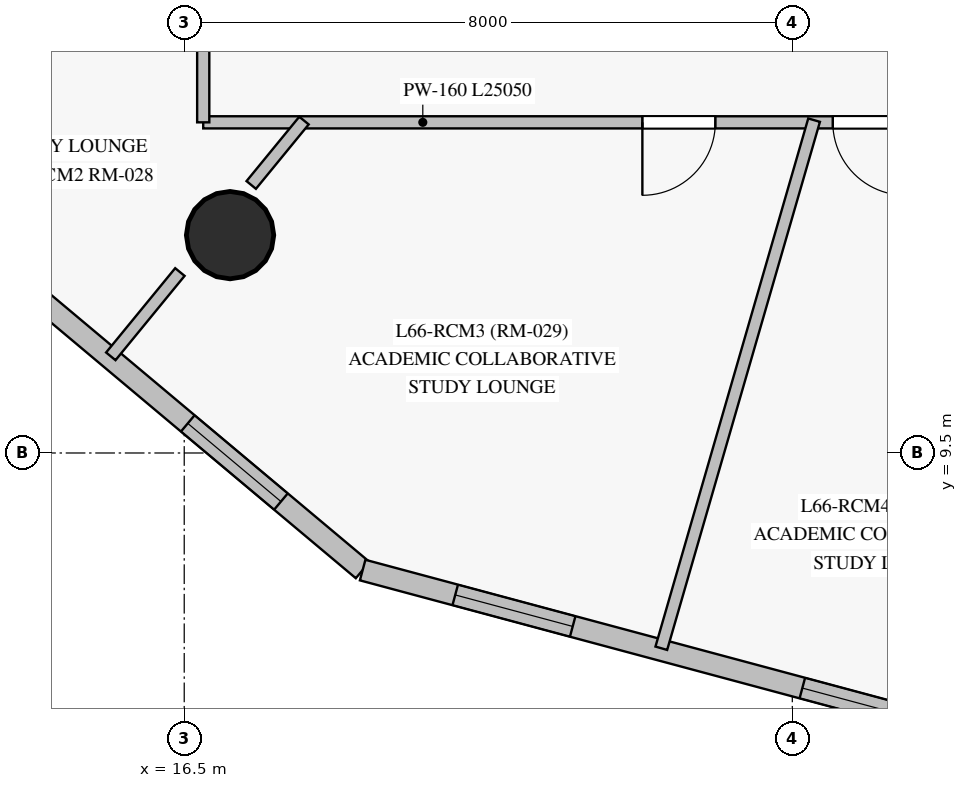
"""IFC4 building model, lengths in metres.
Left out: names, types, materials, properties, quantities, classifications, styles, units other than length and angle.
Written with IfcOpenShell. Run it as: python <this file> out.ifc"""

import sys

from ifc_helpers import new_model, si_unit, direction, frame, frame_2d, origin, origin_with_axes, origin_2d, place, context, subcontext, project, spatial, rectangle, circle, extrude, source, transform, mapped, element, fill, save


model = new_model("IFC4")
c1 = context("Model", 3, precision=1e-05, world=origin(), true_north=direction((0.0, 1.0)))
c2 = subcontext(c1, "Body", "Model", "MODEL_VIEW")
j1 = project(units=[si_unit("LENGTHUNIT", "METRE"), si_unit("PLANEANGLEUNIT", "RADIAN")], contexts=[c1])
p1 = place(None, origin())
s1 = spatial("IfcSite", under=j1, at=p1, CompositionType="ELEMENT")
p2 = place(p1, origin())
s2 = spatial("IfcBuilding", under=s1, at=p2, CompositionType="ELEMENT")
p3 = place(p2, frame((0.0, 0.0, 226.05)))
s3 = spatial("IfcBuildingStorey", under=s2, at=p3, CompositionType="ELEMENT", Elevation=226.05)
m1 = source(origin_with_axes(), c2, "Body", "SweptSolid", [
    extrude(circle(Radius=0.575, at=origin_2d()), origin(), (0.0, 0.0, 1.0), 3.05),
])
p4 = place(p3, frame((17.103, 12.366, 0.0), z_axis=(0.0, 0.0, 1.0), x_axis=(1.0, 0.0, 0.0)))
e1 = element("IfcColumn", 1, at=p4, inside=s3, PredefinedType="COLUMN", context=c2, shape_type="MappedRepresentation", body=[
    mapped(m1, transform((0.0, 0.0, 0.0), scale=1.0)),
])
p5 = place(p3, frame((9.079, 16.153, 0.0), z_axis=(0.0, 0.0, 1.0), x_axis=(0.766159608143, -0.64265033638, 0.0)))
e2 = element("IfcWall", 2, at=p5, inside=s3, PredefinedType="SOLIDWALL", context=c2, shape_type="SweptSolid", body=[
    extrude(rectangle(XDim=12.75, YDim=0.28, at=frame_2d((6.375, 0.0))), origin(), (0.0, 0.0, 1.0), 2.85),
])
p6 = place(p5, frame((0.584, 0.0, 0.85)))
e3 = element("IfcOpeningElement", 3, at=p6, cuts=e2, PredefinedType="OPENING", context=c2, shape_type="SweptSolid", body=[
    extrude(rectangle(XDim=0.95, YDim=1.5, at=frame_2d((0.475, 0.75))), frame((0.0, 0.15, 0.0), z_axis=(0.0, -1.0, 0.0), x_axis=(1.0, 0.0, 0.0)), (0.0, 0.0, 1.0), 0.3),
])
p7 = place(p5, frame((4.431, 0.0, 0.85)))
e4 = element("IfcOpeningElement", 4, at=p7, cuts=e2, PredefinedType="OPENING", context=c2, shape_type="SweptSolid", body=[
    extrude(rectangle(XDim=1.6, YDim=1.6, at=frame_2d((0.8, 0.8))), frame((0.0, 0.15, 0.0), z_axis=(0.0, -1.0, 0.0), x_axis=(1.0, 0.0, 0.0)), (0.0, 0.0, 1.0), 0.3),
])
p8 = place(p5, frame((9.747, 0.0, 0.85)))
e5 = element("IfcOpeningElement", 5, at=p8, cuts=e2, PredefinedType="OPENING", context=c2, shape_type="SweptSolid", body=[
    extrude(rectangle(XDim=1.6, YDim=1.6, at=frame_2d((0.8, 0.8))), frame((0.0, 0.15, 0.0), z_axis=(0.0, -1.0, 0.0), x_axis=(1.0, 0.0, 0.0)), (0.0, 0.0, 1.0), 0.3),
])
p9 = place(p3, frame((18.847, 7.96, 0.0), z_axis=(0.0, 0.0, 1.0), x_axis=(0.965828362132, -0.259182512722, 0.0)))
e6 = element("IfcWall", 6, at=p9, inside=s3, PredefinedType="SOLIDWALL", context=c2, shape_type="SweptSolid", body=[
    extrude(rectangle(XDim=9.576, YDim=0.28, at=frame_2d((4.788, 0.0))), origin(), (0.0, 0.0, 1.0), 2.85),
])
p10 = place(p9, frame((1.261, 0.0, 0.85)))
e7 = element("IfcOpeningElement", 7, at=p10, cuts=e6, PredefinedType="OPENING", context=c2, shape_type="SweptSolid", body=[
    extrude(rectangle(XDim=1.6, YDim=1.6, at=frame_2d((0.8, 0.8))), frame((0.0, 0.15, 0.0), z_axis=(0.0, -1.0, 0.0), x_axis=(1.0, 0.0, 0.0)), (0.0, 0.0, 1.0), 0.3),
])
p11 = place(p9, frame((5.989, 0.0, 0.85)))
e8 = element("IfcOpeningElement", 8, at=p11, cuts=e6, PredefinedType="OPENING", context=c2, shape_type="SweptSolid", body=[
    extrude(rectangle(XDim=1.6, YDim=1.6, at=frame_2d((0.8, 0.8))), frame((0.0, 0.15, 0.0), z_axis=(0.0, -1.0, 0.0), x_axis=(1.0, 0.0, 0.0)), (0.0, 0.0, 1.0), 0.3),
])
p12 = place(p3, frame((41.8, 13.85, 0.0), z_axis=(0.0, 0.0, 1.0), x_axis=(-1.0, 0.0, 0.0)))
e9 = element("IfcWall", 9, at=p12, inside=s3, PredefinedType="PARTITIONING", context=c2, shape_type="SweptSolid", body=[
    extrude(rectangle(XDim=25.05, YDim=0.16, at=frame_2d((12.525, 0.0))), origin(), (0.0, 0.0, 1.0), 2.3),
])
p13 = place(p12, frame((9.563, 0.0, 0.0)))
e10 = element("IfcOpeningElement", 10, at=p13, cuts=e9, PredefinedType="OPENING", context=c2, shape_type="SweptSolid", body=[
    extrude(rectangle(XDim=0.96, YDim=2.15, at=frame_2d((0.48, 1.075))), frame((0.0, 0.09, 0.0), z_axis=(0.0, -1.0, 0.0), x_axis=(1.0, 0.0, 0.0)), (0.0, 0.0, 1.0), 0.18),
])
p14 = place(p12, frame((4.621, 0.0, 0.0)))
e11 = element("IfcOpeningElement", 11, at=p14, cuts=e9, PredefinedType="OPENING", context=c2, shape_type="SweptSolid", body=[
    extrude(rectangle(XDim=0.96, YDim=2.15, at=frame_2d((0.48, 1.075))), frame((0.0, 0.09, 0.0), z_axis=(0.0, -1.0, 0.0), x_axis=(1.0, 0.0, 0.0)), (0.0, 0.0, 1.0), 0.18),
])
p15 = place(p12, frame((18.312, 0.0, 0.0)))
e12 = element("IfcOpeningElement", 12, at=p15, cuts=e9, PredefinedType="OPENING", context=c2, shape_type="SweptSolid", body=[
    extrude(rectangle(XDim=0.96, YDim=2.15, at=frame_2d((0.48, 1.075))), frame((0.0, 0.09, 0.0), z_axis=(0.0, -1.0, 0.0), x_axis=(1.0, 0.0, 0.0)), (0.0, 0.0, 1.0), 0.18),
])
p16 = place(p12, frame((15.808, 0.0, 0.0)))
e13 = element("IfcOpeningElement", 13, at=p16, cuts=e9, PredefinedType="OPENING", context=c2, shape_type="SweptSolid", body=[
    extrude(rectangle(XDim=0.96, YDim=2.15, at=frame_2d((0.48, 1.075))), frame((0.0, 0.09, 0.0), z_axis=(0.0, -1.0, 0.0), x_axis=(1.0, 0.0, 0.0)), (0.0, 0.0, 1.0), 0.18),
])
p17 = place(p3, frame((16.75, 13.85, 0.0), z_axis=(0.0, 0.0, 1.0), x_axis=(0.0, 1.0, 0.0)))
e14 = element("IfcWall", 14, at=p17, inside=s3, PredefinedType="PARTITIONING", context=c2, shape_type="SweptSolid", body=[
    extrude(rectangle(XDim=17.8, YDim=0.16, at=frame_2d((8.9, 0.0))), origin(), (0.0, 0.0, 1.0), 2.45),
])
p18 = place(p17, frame((15.299, 0.0, 0.0)))
e15 = element("IfcOpeningElement", 15, at=p18, cuts=e14, PredefinedType="OPENING", context=c2, shape_type="SweptSolid", body=[
    extrude(rectangle(XDim=0.96, YDim=2.15, at=frame_2d((0.48, 1.075))), frame((0.0, 0.09, 0.0), z_axis=(0.0, -1.0, 0.0), x_axis=(1.0, 0.0, 0.0)), (0.0, 0.0, 1.0), 0.18),
])
p19 = place(p17, frame((11.095, 0.0, 0.0)))
e16 = element("IfcOpeningElement", 16, at=p19, cuts=e14, PredefinedType="OPENING", context=c2, shape_type="SweptSolid", body=[
    extrude(rectangle(XDim=0.96, YDim=2.15, at=frame_2d((0.48, 1.075))), frame((0.0, 0.09, 0.0), z_axis=(0.0, -1.0, 0.0), x_axis=(1.0, 0.0, 0.0)), (0.0, 0.0, 1.0), 0.18),
])
p20 = place(p17, frame((8.425, 0.0, 0.0)))
e17 = element("IfcOpeningElement", 17, at=p20, cuts=e14, PredefinedType="OPENING", context=c2, shape_type="SweptSolid", body=[
    extrude(rectangle(XDim=0.96, YDim=2.15, at=frame_2d((0.48, 1.075))), frame((0.0, 0.09, 0.0), z_axis=(0.0, -1.0, 0.0), x_axis=(1.0, 0.0, 0.0)), (0.0, 0.0, 1.0), 0.18),
])
p21 = place(p17, frame((3.435, 0.0, 0.0)))
e18 = element("IfcOpeningElement", 18, at=p21, cuts=e14, PredefinedType="OPENING", context=c2, shape_type="SweptSolid", body=[
    extrude(rectangle(XDim=0.96, YDim=2.15, at=frame_2d((0.48, 1.075))), frame((0.0, 0.09, 0.0), z_axis=(0.0, -1.0, 0.0), x_axis=(1.0, 0.0, 0.0)), (0.0, 0.0, 1.0), 0.18),
])
p22 = place(p3, frame((24.787, 13.879, 0.0), z_axis=(0.0, 0.0, 1.0), x_axis=(-0.277907263558, -0.960607907974, 0.0)))
e19 = element("IfcWall", 19, at=p22, inside=s3, PredefinedType="PARTITIONING", context=c2, shape_type="SweptSolid", body=[
    extrude(rectangle(XDim=7.233, YDim=0.16, at=frame_2d((3.616, 0.0))), origin(), (0.0, 0.0, 1.0), 2.85),
])
p23 = place(p3, frame((16.443, 11.881, 0.0), z_axis=(0.0, 0.0, 1.0), x_axis=(-0.633849489402, -0.773456414276, 0.0)))
e20 = element("IfcWall", 20, at=p23, inside=s3, PredefinedType="PARTITIONING", context=c2, shape_type="SweptSolid", body=[
    extrude(rectangle(XDim=1.434, YDim=0.16, at=frame_2d((0.717, 0.0))), origin(), (0.0, 0.0, 1.0), 2.85),
])
p24 = place(p3, frame((18.076, 13.873, 0.0), z_axis=(0.0, 0.0, 1.0), x_axis=(-0.633650360899, -0.773619557749, 0.0)))
e21 = element("IfcWall", 21, at=p24, inside=s3, PredefinedType="PARTITIONING", context=c2, shape_type="SweptSolid", body=[
    extrude(rectangle(XDim=1.095, YDim=0.16, at=frame_2d((0.548, 0.0))), origin(), (0.0, 0.0, 1.0), 2.35),
])
m2 = source(origin_with_axes(), c2, "Body", "SweptSolid", [
    extrude(rectangle(XDim=1.6, YDim=1.6, at=frame_2d((0.8, 0.8))), frame((0.0, 0.03, 0.0), z_axis=(0.0, -1.0, 0.0), x_axis=(1.0, 0.0, 0.0)), (0.0, 0.0, 1.0), 0.06),
])
p25 = place(p8, origin())
e22 = element("IfcWindow", 22, at=p25, inside=s3, PartitioningType="SINGLE_PANEL", PredefinedType="WINDOW", context=c2, shape_type="MappedRepresentation", body=[
    mapped(m2, transform((0.0, 0.0, 0.0), scale=1.0)),
])
fill(e5, e22)
p26 = place(p10, origin())
e23 = element("IfcWindow", 23, at=p26, inside=s3, PartitioningType="SINGLE_PANEL", PredefinedType="WINDOW", context=c2, shape_type="MappedRepresentation", body=[
    mapped(m2, transform((0.0, 0.0, 0.0), scale=1.0)),
])
fill(e7, e23)
p27 = place(p11, origin())
e24 = element("IfcWindow", 24, at=p27, inside=s3, PartitioningType="SINGLE_PANEL", PredefinedType="WINDOW", context=c2, shape_type="MappedRepresentation", body=[
    mapped(m2, transform((0.0, 0.0, 0.0), scale=1.0)),
])
fill(e8, e24)
m3 = source(origin_with_axes(), c2, "Body", "SweptSolid", [
    extrude(rectangle(XDim=0.96, YDim=2.15, at=frame_2d((0.48, 1.075))), frame((0.0, 0.025, 0.0), z_axis=(0.0, -1.0, 0.0), x_axis=(1.0, 0.0, 0.0)), (0.0, 0.0, 1.0), 0.05),
])
p28 = place(p15, origin())
e25 = element("IfcDoor", 25, at=p28, inside=s3, OperationType="SINGLE_SWING_RIGHT", PredefinedType="DOOR", context=c2, shape_type="MappedRepresentation", body=[
    mapped(m3, transform((0.0, 0.0, 0.0), scale=1.0)),
])
fill(e12, e25)
p29 = place(p16, origin())
e26 = element("IfcDoor", 26, at=p29, inside=s3, OperationType="SINGLE_SWING_LEFT", PredefinedType="DOOR", context=c2, shape_type="MappedRepresentation", body=[
    mapped(m3, transform((0.0, 0.0, 0.0), scale=1.0)),
])
fill(e13, e26)
save(model, sys.argv[1])
